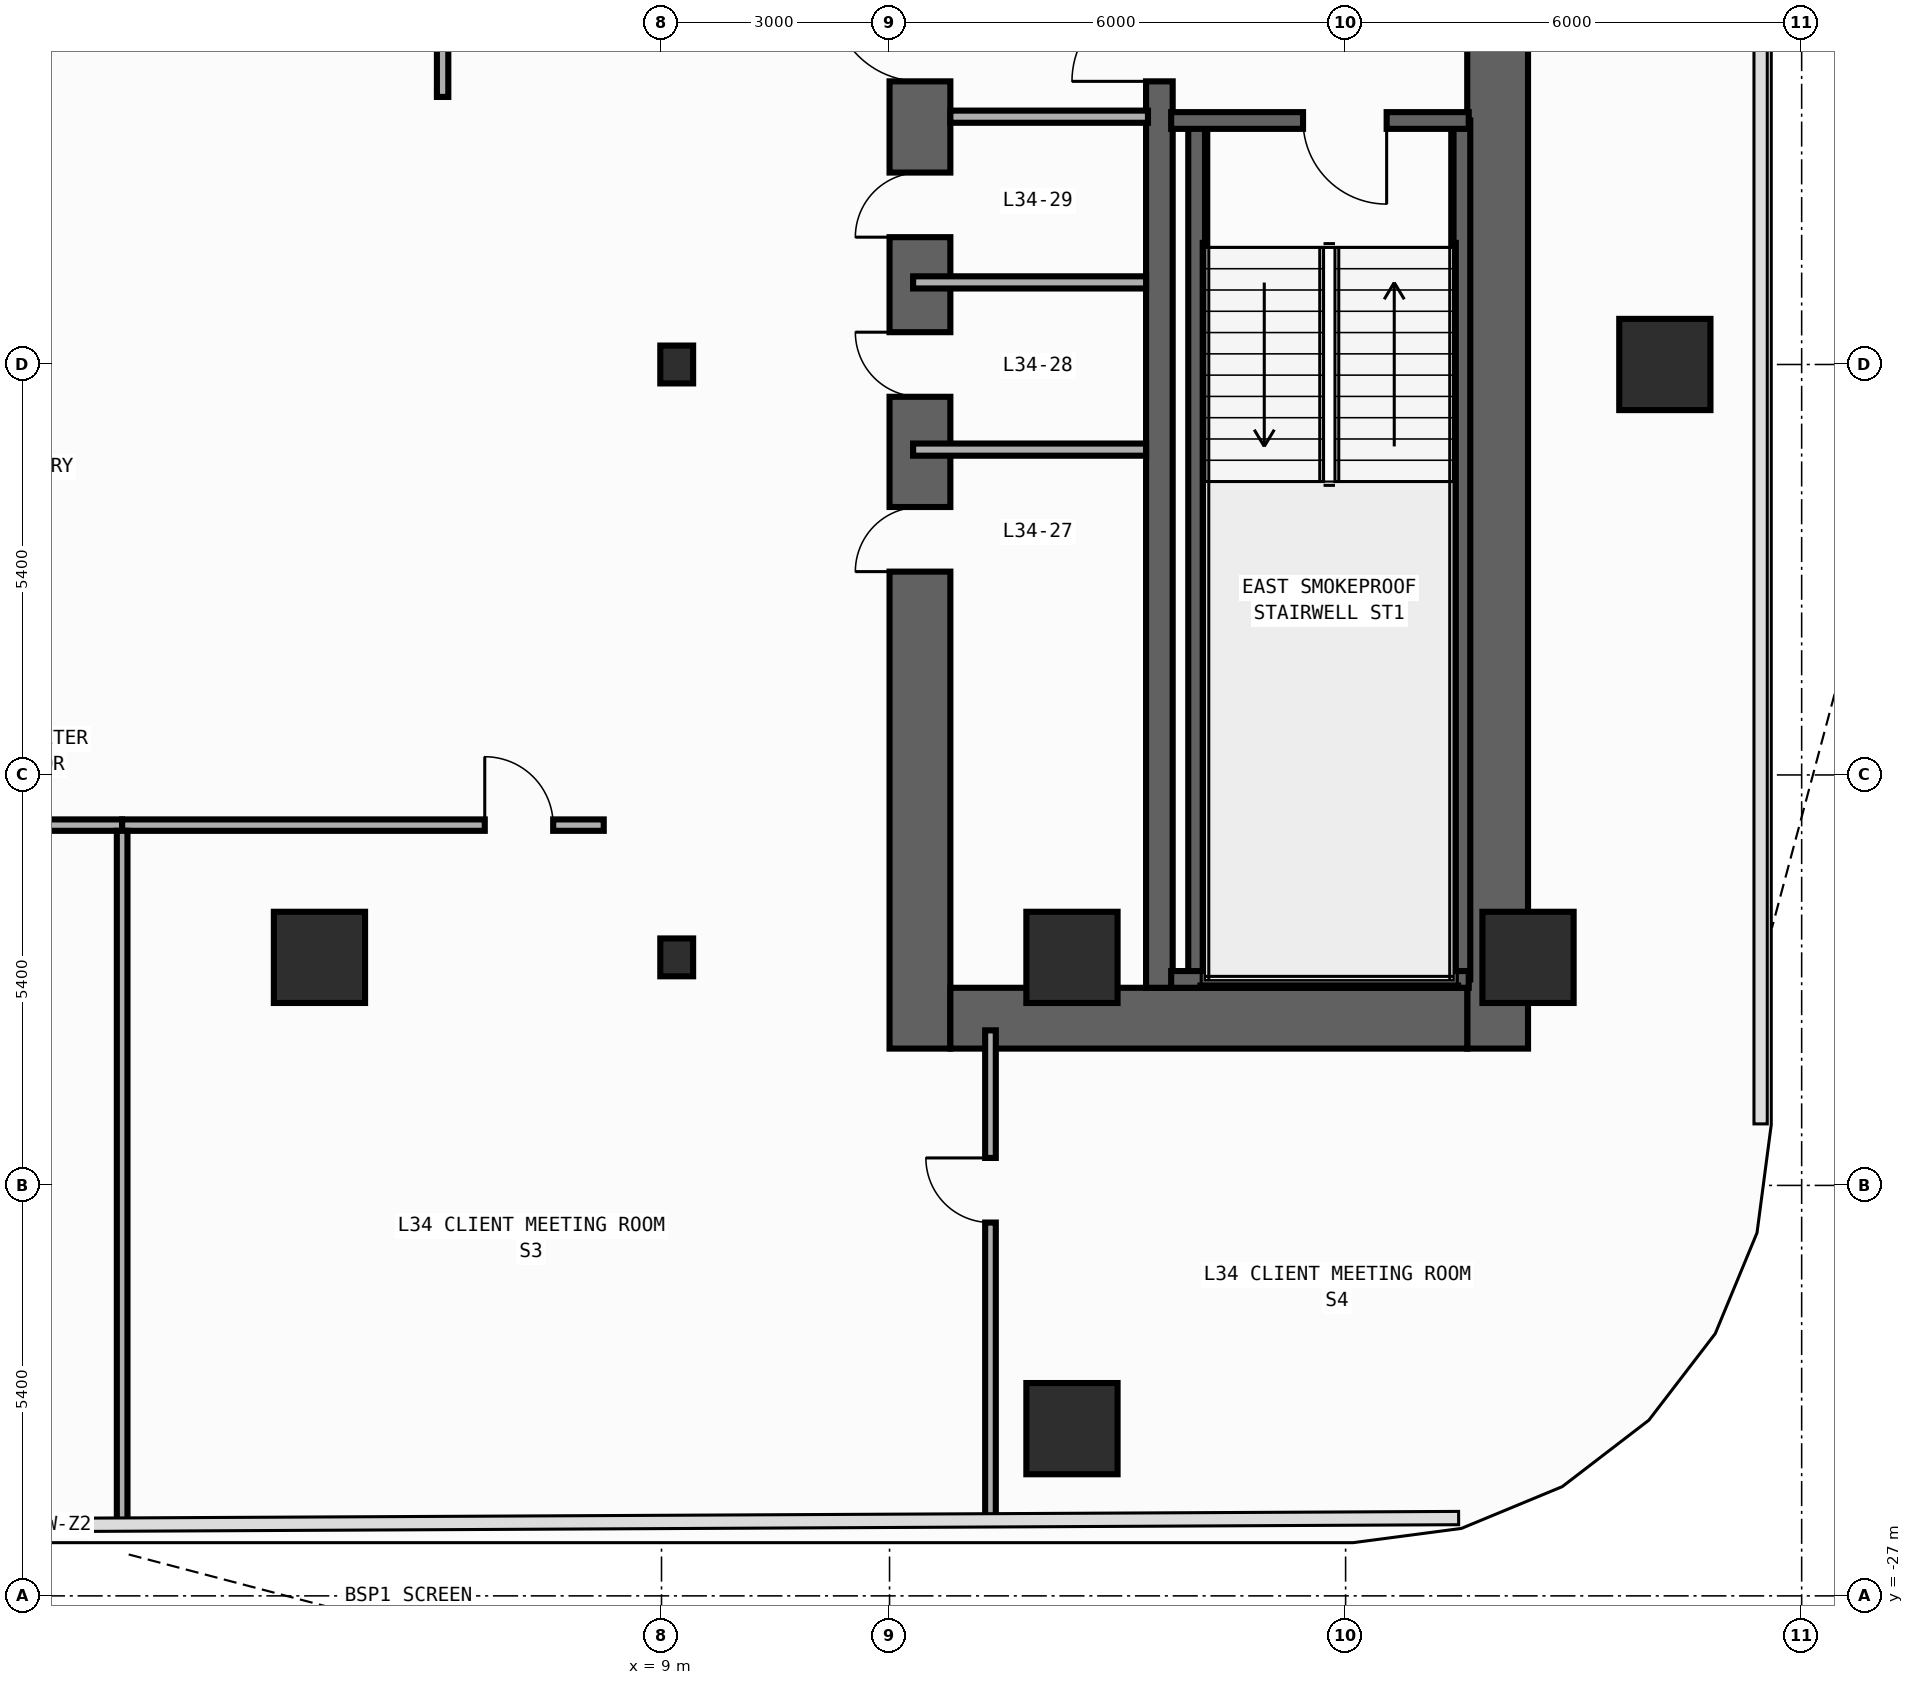
"""IFC4 building model, lengths in metres.
Left out: names, types, materials, properties, quantities, classifications, styles, units other than length and angle.
Written with IfcOpenShell. Run it as: python <this file> out.ifc"""

import sys

from ifc_helpers import new_model, si_unit, direction, frame, frame_2d, origin, origin_2d, place, context, subcontext, project, spatial, rectangle, i_section, extrude, element, fill, save


model = new_model("IFC4")
c1 = context("Model", 3, precision=1e-05, world=origin(), true_north=direction((0.0, 1.0)))
c2 = subcontext(c1, "Body", "Model", "MODEL_VIEW")
j1 = project(units=[si_unit("LENGTHUNIT", "METRE"), si_unit("PLANEANGLEUNIT", "RADIAN")], contexts=[c1])
p1 = place(None, origin())
s1 = spatial("IfcSite", under=j1, at=p1, CompositionType="ELEMENT")
p2 = place(p1, origin())
s2 = spatial("IfcBuilding", under=s1, at=p2, CompositionType="ELEMENT")
p3 = place(p2, frame((0.0, 0.0, 147.8)))
s3 = spatial("IfcBuildingStorey", under=s2, at=p3, CompositionType="ELEMENT", Elevation=147.8)
p4 = place(p3, frame((12.4, -19.8, 0.0), z_axis=(0.0, 0.0, 1.0), x_axis=(0.0, 1.0, 0.0)))
e1 = element("IfcWall", 1, at=p4, inside=s3, PredefinedType="SHEAR", context=c2, shape_type="SweptSolid", body=[
    extrude(rectangle(XDim=27.0, YDim=0.8, at=frame_2d((13.5, 0.0))), origin(), (0.0, 0.0, 1.0), 3.85),
])
p5 = place(p4, frame((23.05, 0.0, 0.0)))
e2 = element("IfcOpeningElement", 2, at=p5, cuts=e1, PredefinedType="OPENING", context=c2, shape_type="SweptSolid", body=[
    extrude(rectangle(XDim=1.1, YDim=2.2, at=frame_2d((0.55, 1.1))), frame((0.0, 0.41, 0.0), z_axis=(0.0, -1.0, 0.0), x_axis=(1.0, 0.0, 0.0)), (0.0, 0.0, 1.0), 0.82),
])
p6 = place(p4, frame((19.85, 0.0, 0.0)))
e3 = element("IfcOpeningElement", 3, at=p6, cuts=e1, PredefinedType="OPENING", context=c2, shape_type="SweptSolid", body=[
    extrude(rectangle(XDim=1.1, YDim=2.2, at=frame_2d((0.55, 1.1))), frame((0.0, 0.41, 0.0), z_axis=(0.0, -1.0, 0.0), x_axis=(1.0, 0.0, 0.0)), (0.0, 0.0, 1.0), 0.82),
])
p7 = place(p4, frame((16.65, 0.0, 0.0)))
e4 = element("IfcOpeningElement", 4, at=p7, cuts=e1, PredefinedType="OPENING", context=c2, shape_type="SweptSolid", body=[
    extrude(rectangle(XDim=1.1, YDim=2.2, at=frame_2d((0.55, 1.1))), frame((0.0, 0.41, 0.0), z_axis=(0.0, -1.0, 0.0), x_axis=(1.0, 0.0, 0.0)), (0.0, 0.0, 1.0), 0.82),
])
p8 = place(p4, frame((6.275, 0.0, 0.0)))
e5 = element("IfcOpeningElement", 5, at=p8, cuts=e1, PredefinedType="OPENING", context=c2, shape_type="SweptSolid", body=[
    extrude(rectangle(XDim=0.85, YDim=2.1, at=frame_2d((0.425, 1.05))), frame((0.0, 0.41, 0.0), z_axis=(0.0, -1.0, 0.0), x_axis=(1.0, 0.0, 0.0)), (0.0, 0.0, 1.0), 0.82),
])
p9 = place(p4, frame((8.575, 0.0, 0.0)))
e6 = element("IfcOpeningElement", 6, at=p9, cuts=e1, PredefinedType="OPENING", context=c2, shape_type="SweptSolid", body=[
    extrude(rectangle(XDim=0.85, YDim=2.1, at=frame_2d((0.425, 1.05))), frame((0.0, 0.41, 0.0), z_axis=(0.0, -1.0, 0.0), x_axis=(1.0, 0.0, 0.0)), (0.0, 0.0, 1.0), 0.82),
])
p10 = place(p4, frame((10.675, 0.0, 0.0)))
e7 = element("IfcOpeningElement", 7, at=p10, cuts=e1, PredefinedType="OPENING", context=c2, shape_type="SweptSolid", body=[
    extrude(rectangle(XDim=0.85, YDim=2.1, at=frame_2d((0.425, 1.05))), frame((0.0, 0.41, 0.0), z_axis=(0.0, -1.0, 0.0), x_axis=(1.0, 0.0, 0.0)), (0.0, 0.0, 1.0), 0.82),
])
p11 = place(p4, frame((12.725, 0.0, 0.0)))
e8 = element("IfcOpeningElement", 8, at=p11, cuts=e1, PredefinedType="OPENING", context=c2, shape_type="SweptSolid", body=[
    extrude(rectangle(XDim=1.15, YDim=2.2, at=frame_2d((0.575, 1.1))), frame((0.0, 0.41, 0.0), z_axis=(0.0, -1.0, 0.0), x_axis=(1.0, 0.0, 0.0)), (0.0, 0.0, 1.0), 0.82),
])
p12 = place(p4, frame((25.125, 0.0, 0.0)))
e9 = element("IfcOpeningElement", 9, at=p12, cuts=e1, PredefinedType="OPENING", context=c2, shape_type="SweptSolid", body=[
    extrude(rectangle(XDim=0.85, YDim=2.1, at=frame_2d((0.425, 1.05))), frame((0.0, 0.41, 0.0), z_axis=(0.0, -1.0, 0.0), x_axis=(1.0, 0.0, 0.0)), (0.0, 0.0, 1.0), 0.82),
])
p13 = place(p3, frame((20.0, -19.8, 0.0), z_axis=(0.0, 0.0, 1.0), x_axis=(0.0, 1.0, 0.0)))
e10 = element("IfcWall", 10, at=p13, inside=s3, PredefinedType="SHEAR", context=c2, shape_type="SweptSolid", body=[
    extrude(rectangle(XDim=27.0, YDim=0.8, at=frame_2d((13.5, 0.0))), origin(), (0.0, 0.0, 1.0), 3.85),
])
p14 = place(p3, frame((12.8, -19.4, 0.0), z_axis=(0.0, 0.0, 1.0), x_axis=(1.0, 0.0, 0.0)))
e11 = element("IfcWall", 11, at=p14, inside=s3, PredefinedType="SHEAR", context=c2, shape_type="SweptSolid", body=[
    extrude(rectangle(XDim=6.8, YDim=0.8, at=frame_2d((3.4, 0.0))), origin(), (0.0, 0.0, 1.0), 3.85),
])
p15 = place(p3, frame((15.55, -19.0, 0.0), z_axis=(0.0, 0.0, 1.0), x_axis=(0.0, 1.0, 0.0)))
e12 = element("IfcWall", 12, at=p15, inside=s3, PredefinedType="SHEAR", context=c2, shape_type="SweptSolid", body=[
    extrude(rectangle(XDim=25.4, YDim=0.35, at=frame_2d((12.7, 0.0))), origin(), (0.0, 0.0, 1.0), 3.85),
])
p16 = place(p15, frame((11.925, 0.0, 0.0)))
e13 = element("IfcOpeningElement", 13, at=p16, cuts=e12, PredefinedType="OPENING", context=c2, shape_type="SweptSolid", body=[
    extrude(rectangle(XDim=1.15, YDim=2.2, at=frame_2d((0.575, 1.1))), frame((0.0, 0.185, 0.0), z_axis=(0.0, -1.0, 0.0), x_axis=(1.0, 0.0, 0.0)), (0.0, 0.0, 1.0), 0.37),
])
p17 = place(p15, frame((24.325, 0.0, 0.0)))
e14 = element("IfcOpeningElement", 14, at=p17, cuts=e12, PredefinedType="OPENING", context=c2, shape_type="SweptSolid", body=[
    extrude(rectangle(XDim=0.85, YDim=2.1, at=frame_2d((0.425, 1.05))), frame((0.0, 0.185, 0.0), z_axis=(0.0, -1.0, 0.0), x_axis=(1.0, 0.0, 0.0)), (0.0, 0.0, 1.0), 0.37),
])
for number, where, z_axis, x_axis in (
    (15, (16.04, -18.89, 0.0), (0.0, 0.0, 1.0), (0.0, 1.0, 0.0)),
    (16, (19.53, -18.89, 0.0), (0.0, 0.0, 1.0), (0.0, 1.0, 0.0)),
):
    element("IfcWall", number, at=place(p3, frame(where, z_axis=z_axis, x_axis=x_axis)), inside=s3, PredefinedType="SHEAR", context=c2, shape_type="SweptSolid", body=[
        extrude(rectangle(XDim=11.3, YDim=0.22, at=frame_2d((5.65, 0.0))), origin(), (0.0, 0.0, 1.0), 3.85),
    ])
p18 = place(p3, frame((15.705, -18.89, 0.0), z_axis=(0.0, 0.0, 1.0), x_axis=(1.0, 0.0, 0.0)))
e17 = element("IfcWall", 17, at=p18, inside=s3, PredefinedType="SHEAR", context=c2, shape_type="SweptSolid", body=[
    extrude(rectangle(XDim=3.915, YDim=0.22, at=frame_2d((1.958, 0.0))), origin(), (0.0, 0.0, 1.0), 3.85),
])
p19 = place(p3, frame((19.62, -7.59, 0.0), z_axis=(0.0, 0.0, 1.0), x_axis=(-1.0, 0.0, 0.0)))
e18 = element("IfcWall", 18, at=p19, inside=s3, PredefinedType="SHEAR", context=c2, shape_type="SweptSolid", body=[
    extrude(rectangle(XDim=3.915, YDim=0.22, at=frame_2d((1.958, 0.0))), origin(), (0.0, 0.0, 1.0), 3.85),
])
p20 = place(p19, frame((1.08, 0.0, 0.0)))
e19 = element("IfcOpeningElement", 19, at=p20, cuts=e18, PredefinedType="OPENING", context=c2, shape_type="SweptSolid", body=[
    extrude(rectangle(XDim=1.1, YDim=2.2, at=frame_2d((0.55, 1.1))), frame((0.0, 0.12, 0.0), z_axis=(0.0, -1.0, 0.0), x_axis=(1.0, 0.0, 0.0)), (0.0, 0.0, 1.0), 0.24),
])
for number, where, z_axis, x_axis in (
    (20, (9.2, -18.6, 0.0), (0.0, 0.0, 1.0), (1.0, 0.0, 0.0)),
    (21, (9.2, -10.8, 0.0), (0.0, 0.0, 1.0), (1.0, 0.0, 0.0)),
):
    element("IfcColumn", number, at=place(p3, frame(where, z_axis=z_axis, x_axis=x_axis)), inside=s3, PredefinedType="COLUMN", context=c2, shape_type="SweptSolid", body=[
        extrude(i_section(OverallWidth=0.432, OverallDepth=0.498, WebThickness=0.045, FlangeThickness=0.07, FilletRadius=0.022, at=origin_2d()), origin(), (0.0, 0.0, 1.0), 4.2),
    ])
for number, where, z_axis, x_axis in (
    (22, (20.4, -18.6, 0.0), (0.0, 0.0, 1.0), (1.0, 0.0, 0.0)),
    (23, (14.4, -18.6, 0.0), (0.0, 0.0, 1.0), (1.0, 0.0, 0.0)),
    (24, (4.5, -18.6, 0.0), (0.0, 0.0, 1.0), (1.0, 0.0, 0.0)),
    (25, (22.2, -10.8, 0.0), (0.0, 0.0, 1.0), (1.0, 0.0, 0.0)),
    (26, (14.4, -24.8, 0.0), (0.0, 0.0, 1.0), (1.0, 0.0, 0.0)),
):
    element("IfcColumn", number, at=place(p3, frame(where, z_axis=z_axis, x_axis=x_axis)), inside=s3, PredefinedType="COLUMN", context=c2, shape_type="SweptSolid", body=[
        extrude(rectangle(XDim=1.2, YDim=1.2, at=origin_2d()), origin(), (0.0, 0.0, 1.0), 4.2),
    ])
p21 = place(p3, frame((12.8, -7.54, 0.0), z_axis=(0.0, 0.0, 1.0), x_axis=(1.0, 0.0, 0.0)))
e27 = element("IfcWall", 27, at=p21, inside=s3, PredefinedType="STANDARD", context=c2, shape_type="SweptSolid", body=[
    extrude(rectangle(XDim=2.6, YDim=0.16, at=frame_2d((1.3, 0.0))), origin(), (0.0, 0.0, 1.0), 3.85),
])
for number, where, z_axis, x_axis in (
    (28, (12.31, -11.92, 0.0), (0.0, 0.0, 1.0), (1.0, 0.0, 0.0)),
    (29, (12.31, -9.72, 0.0), (0.0, 0.0, 1.0), (1.0, 0.0, 0.0)),
):
    element("IfcWall", number, at=place(p3, frame(where, z_axis=z_axis, x_axis=x_axis)), inside=s3, PredefinedType="PARTITIONING", context=c2, shape_type="SweptSolid", body=[
        extrude(rectangle(XDim=3.065, YDim=0.16, at=frame_2d((1.532, 0.0))), origin(), (0.0, 0.0, 1.0), 3.85),
    ])
p22 = place(p3, frame((6.12, -7.28, 0.0), z_axis=(0.0, 0.0, 1.0), x_axis=(0.0, 1.0, 0.0)))
e30 = element("IfcWall", 30, at=p22, inside=s3, PredefinedType="PARTITIONING", context=c2, shape_type="SweptSolid", body=[
    extrude(rectangle(XDim=17.925, YDim=0.15, at=frame_2d((8.962, 0.0))), origin(), (0.0, 0.0, 1.0), 3.85),
])
p23 = place(p22, frame((1.467, 0.0, 0.0)))
e31 = element("IfcOpeningElement", 31, at=p23, cuts=e30, PredefinedType="OPENING", context=c2, shape_type="SweptSolid", body=[
    extrude(rectangle(XDim=0.9, YDim=2.15, at=frame_2d((0.45, 1.075))), frame((0.0, 0.085, 0.0), z_axis=(0.0, -1.0, 0.0), x_axis=(1.0, 0.0, 0.0)), (0.0, 0.0, 1.0), 0.17),
])
p24 = place(p3, frame((-8.24, -16.86, 0.0), z_axis=(0.0, 0.0, 1.0), x_axis=(1.0, 0.0, 0.0)))
e32 = element("IfcWall", 32, at=p24, inside=s3, PredefinedType="PARTITIONING", context=c2, shape_type="SweptSolid", body=[
    extrude(rectangle(XDim=10.144, YDim=0.15, at=frame_2d((5.072, 0.0))), origin(), (0.0, 0.0, 1.0), 3.85),
])
p25 = place(p24, frame((0.663, 0.0, 0.0)))
e33 = element("IfcOpeningElement", 33, at=p25, cuts=e32, PredefinedType="OPENING", context=c2, shape_type="SweptSolid", body=[
    extrude(rectangle(XDim=0.9, YDim=2.15, at=frame_2d((0.45, 1.075))), frame((0.0, 0.085, 0.0), z_axis=(0.0, -1.0, 0.0), x_axis=(1.0, 0.0, 0.0)), (0.0, 0.0, 1.0), 0.17),
])
p26 = place(p3, frame((1.904, -16.86, 0.0), z_axis=(0.0, 0.0, 1.0), x_axis=(1.0, 0.0, 0.0)))
e34 = element("IfcWall", 34, at=p26, inside=s3, PredefinedType="PARTITIONING", context=c2, shape_type="SweptSolid", body=[
    extrude(rectangle(XDim=6.336, YDim=0.15, at=frame_2d((3.168, 0.0))), origin(), (0.0, 0.0, 1.0), 3.85),
])
p27 = place(p26, frame((4.771, 0.0, 0.0)))
e35 = element("IfcOpeningElement", 35, at=p27, cuts=e34, PredefinedType="OPENING", context=c2, shape_type="SweptSolid", body=[
    extrude(rectangle(XDim=0.9, YDim=2.15, at=frame_2d((0.45, 1.075))), frame((0.0, 0.085, 0.0), z_axis=(0.0, -1.0, 0.0), x_axis=(1.0, 0.0, 0.0)), (0.0, 0.0, 1.0), 0.17),
])
p28 = place(p3, frame((1.904, -26.057, 0.0), z_axis=(0.0, 0.0, 1.0), x_axis=(0.0, 1.0, 0.0)))
e36 = element("IfcWall", 36, at=p28, inside=s3, PredefinedType="PARTITIONING", context=c2, shape_type="SweptSolid", body=[
    extrude(rectangle(XDim=9.122, YDim=0.14, at=frame_2d((4.561, 0.0))), origin(), (0.0, 0.0, 1.0), 3.85),
])
p29 = place(p3, frame((13.328, -26.001, 0.0), z_axis=(0.0, 0.0, 1.0), x_axis=(0.0, 1.0, 0.0)))
e37 = element("IfcWall", 37, at=p29, inside=s3, PredefinedType="PARTITIONING", context=c2, shape_type="SweptSolid", body=[
    extrude(rectangle(XDim=6.441, YDim=0.14, at=frame_2d((3.221, 0.0))), origin(), (0.0, 0.0, 1.0), 3.85),
])
p30 = place(p29, frame((3.913, 0.0, 0.0)))
e38 = element("IfcOpeningElement", 38, at=p30, cuts=e37, PredefinedType="OPENING", context=c2, shape_type="SweptSolid", body=[
    extrude(rectangle(XDim=0.85, YDim=2.1, at=frame_2d((0.425, 1.05))), frame((0.0, 0.08, 0.0), z_axis=(0.0, -1.0, 0.0), x_axis=(1.0, 0.0, 0.0)), (0.0, 0.0, 1.0), 0.16),
])
p31 = place(p20, origin())
e39 = element("IfcDoor", 39, at=p31, inside=s3, OperationType="SINGLE_SWING_LEFT", PredefinedType="DOOR", context=c2, shape_type="SweptSolid", body=[
    extrude(rectangle(XDim=1.1, YDim=2.2, at=frame_2d((0.55, 1.1))), frame((0.0, 0.025, 0.0), z_axis=(0.0, -1.0, 0.0), x_axis=(1.0, 0.0, 0.0)), (0.0, 0.0, 1.0), 0.05),
])
fill(e19, e39)
p32 = place(p8, origin())
e40 = element("IfcDoor", 40, at=p32, inside=s3, OperationType="SINGLE_SWING_LEFT", PredefinedType="DOOR", context=c2, shape_type="SweptSolid", body=[
    extrude(rectangle(XDim=0.85, YDim=2.1, at=frame_2d((0.425, 1.05))), frame((0.0, 0.025, 0.0), z_axis=(0.0, -1.0, 0.0), x_axis=(1.0, 0.0, 0.0)), (0.0, 0.0, 1.0), 0.05),
])
fill(e5, e40)
p33 = place(p9, origin())
e41 = element("IfcDoor", 41, at=p33, inside=s3, OperationType="SINGLE_SWING_RIGHT", PredefinedType="DOOR", context=c2, shape_type="SweptSolid", body=[
    extrude(rectangle(XDim=0.85, YDim=2.1, at=frame_2d((0.425, 1.05))), frame((0.0, 0.025, 0.0), z_axis=(0.0, -1.0, 0.0), x_axis=(1.0, 0.0, 0.0)), (0.0, 0.0, 1.0), 0.05),
])
fill(e6, e41)
p34 = place(p10, origin())
e42 = element("IfcDoor", 42, at=p34, inside=s3, OperationType="SINGLE_SWING_LEFT", PredefinedType="DOOR", context=c2, shape_type="SweptSolid", body=[
    extrude(rectangle(XDim=0.85, YDim=2.1, at=frame_2d((0.425, 1.05))), frame((0.0, 0.025, 0.0), z_axis=(0.0, -1.0, 0.0), x_axis=(1.0, 0.0, 0.0)), (0.0, 0.0, 1.0), 0.05),
])
fill(e7, e42)
p35 = place(p11, origin())
e43 = element("IfcDoor", 43, at=p35, inside=s3, OperationType="SINGLE_SWING_RIGHT", PredefinedType="DOOR", context=c2, shape_type="SweptSolid", body=[
    extrude(rectangle(XDim=1.15, YDim=2.2, at=frame_2d((0.575, 1.1))), frame((0.0, 0.025, 0.0), z_axis=(0.0, -1.0, 0.0), x_axis=(1.0, 0.0, 0.0)), (0.0, 0.0, 1.0), 0.05),
])
fill(e8, e43)
p36 = place(p16, origin())
e44 = element("IfcDoor", 44, at=p36, inside=s3, OperationType="SINGLE_SWING_LEFT", PredefinedType="DOOR", context=c2, shape_type="SweptSolid", body=[
    extrude(rectangle(XDim=1.15, YDim=2.2, at=frame_2d((0.575, 1.1))), frame((0.0, 0.025, 0.0), z_axis=(0.0, -1.0, 0.0), x_axis=(1.0, 0.0, 0.0)), (0.0, 0.0, 1.0), 0.05),
])
fill(e13, e44)
p37 = place(p27, origin())
e45 = element("IfcDoor", 45, at=p37, inside=s3, OperationType="SINGLE_SWING_LEFT", PredefinedType="DOOR", context=c2, shape_type="SweptSolid", body=[
    extrude(rectangle(XDim=0.9, YDim=2.15, at=frame_2d((0.45, 1.075))), frame((0.0, 0.025, 0.0), z_axis=(0.0, -1.0, 0.0), x_axis=(1.0, 0.0, 0.0)), (0.0, 0.0, 1.0), 0.05),
])
fill(e35, e45)
p38 = place(p30, origin())
e46 = element("IfcDoor", 46, at=p38, inside=s3, OperationType="SINGLE_SWING_RIGHT", PredefinedType="DOOR", context=c2, shape_type="SweptSolid", body=[
    extrude(rectangle(XDim=0.85, YDim=2.1, at=frame_2d((0.425, 1.05))), frame((0.0, 0.025, 0.0), z_axis=(0.0, -1.0, 0.0), x_axis=(1.0, 0.0, 0.0)), (0.0, 0.0, 1.0), 0.05),
])
fill(e38, e46)
save(model, sys.argv[1])
